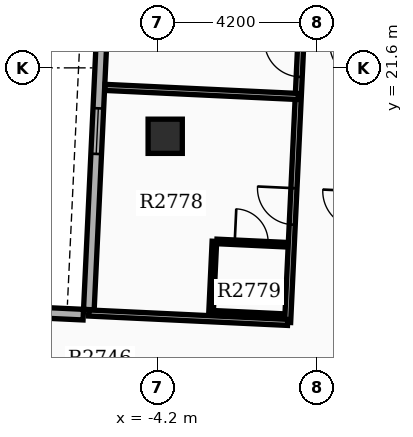
"""IFC4 building model, lengths in metres.
Left out: names, types, materials, properties, quantities, classifications, styles, units other than length and angle.
Written with IfcOpenShell. Run it as: python <this file> out.ifc"""

import sys

from ifc_helpers import new_model, si_unit, direction, frame, frame_2d, origin, origin_2d, place, context, subcontext, project, spatial, rectangle, extrude, element, fill, save


model = new_model("IFC4")
c1 = context("Model", 3, precision=1e-05, world=origin(), true_north=direction((0.0, 1.0)))
c2 = subcontext(c1, "Body", "Model", "MODEL_VIEW")
j1 = project(units=[si_unit("LENGTHUNIT", "METRE"), si_unit("PLANEANGLEUNIT", "RADIAN")], contexts=[c1])
p1 = place(None, origin())
s1 = spatial("IfcSite", under=j1, at=p1, CompositionType="ELEMENT")
p2 = place(p1, origin())
s2 = spatial("IfcBuilding", under=s1, at=p2, CompositionType="ELEMENT")
p3 = place(p2, frame((0.0, 0.0, 172.2)))
s3 = spatial("IfcBuildingStorey", under=s2, at=p3, CompositionType="ELEMENT", Elevation=172.2)
p4 = place(p3, frame((-4.0, 19.8, 0.0), z_axis=(0.0, 0.0, 1.0), x_axis=(1.0, 0.0, 0.0)))
e1 = element("IfcColumn", 1, at=p4, inside=s3, PredefinedType="COLUMN", context=c2, shape_type="SweptSolid", body=[
    extrude(rectangle(XDim=0.9, YDim=0.9, at=origin_2d()), origin(), (0.0, 0.0, 1.0), 3.9),
])
p5 = place(p3, frame((-5.062, 35.318, 0.0), z_axis=(0.0, 0.0, 1.0), x_axis=(-0.047103473814, -0.998890015344, 0.0)))
e2 = element("IfcWall", 2, at=p5, inside=s3, PredefinedType="STANDARD", context=c2, shape_type="SweptSolid", body=[
    extrude(rectangle(XDim=20.1, YDim=0.28, at=frame_2d((10.05, 0.0))), origin(), (0.0, 0.0, 1.0), 2.97),
])
p6 = place(p5, frame((1.6, 0.0, 0.8)))
e3 = element("IfcOpeningElement", 3, at=p6, cuts=e2, PredefinedType="OPENING", context=c2, shape_type="SweptSolid", body=[
    extrude(rectangle(XDim=1.4, YDim=1.6, at=frame_2d((0.7, 0.8))), frame((0.0, 0.15, 0.0), z_axis=(0.0, -1.0, 0.0), x_axis=(1.0, 0.0, 0.0)), (0.0, 0.0, 1.0), 0.3),
])
p7 = place(p5, frame((4.8, 0.0, 0.8)))
e4 = element("IfcOpeningElement", 4, at=p7, cuts=e2, PredefinedType="OPENING", context=c2, shape_type="SweptSolid", body=[
    extrude(rectangle(XDim=1.4, YDim=1.6, at=frame_2d((0.7, 0.8))), frame((0.0, 0.15, 0.0), z_axis=(0.0, -1.0, 0.0), x_axis=(1.0, 0.0, 0.0)), (0.0, 0.0, 1.0), 0.3),
])
p8 = place(p5, frame((8.0, 0.0, 0.8)))
e5 = element("IfcOpeningElement", 5, at=p8, cuts=e2, PredefinedType="OPENING", context=c2, shape_type="SweptSolid", body=[
    extrude(rectangle(XDim=1.4, YDim=1.6, at=frame_2d((0.7, 0.8))), frame((0.0, 0.15, 0.0), z_axis=(0.0, -1.0, 0.0), x_axis=(1.0, 0.0, 0.0)), (0.0, 0.0, 1.0), 0.3),
])
p9 = place(p5, frame((11.2, 0.0, 0.8)))
e6 = element("IfcOpeningElement", 6, at=p9, cuts=e2, PredefinedType="OPENING", context=c2, shape_type="SweptSolid", body=[
    extrude(rectangle(XDim=1.4, YDim=1.6, at=frame_2d((0.7, 0.8))), frame((0.0, 0.15, 0.0), z_axis=(0.0, -1.0, 0.0), x_axis=(1.0, 0.0, 0.0)), (0.0, 0.0, 1.0), 0.3),
])
p10 = place(p5, frame((14.799, 0.0, 0.85)))
e7 = element("IfcOpeningElement", 7, at=p10, cuts=e2, PredefinedType="OPENING", context=c2, shape_type="SweptSolid", body=[
    extrude(rectangle(XDim=1.2, YDim=1.6, at=frame_2d((0.6, 0.8))), frame((0.0, 0.15, 0.0), z_axis=(0.0, -1.0, 0.0), x_axis=(1.0, 0.0, 0.0)), (0.0, 0.0, 1.0), 0.3),
])
p11 = place(p3, frame((-12.448, 15.404, 0.0), z_axis=(0.0, 0.0, 1.0), x_axis=(0.998889082162, -0.047123258997, 0.0)))
e8 = element("IfcWall", 8, at=p11, inside=s3, PredefinedType="STANDARD", context=c2, shape_type="SweptSolid", body=[
    extrude(rectangle(XDim=6.3, YDim=0.28, at=frame_2d((3.15, 0.0))), origin(), (0.0, 0.0, 1.0), 2.97),
])
p12 = place(p3, frame((-0.779, 14.903, 0.0), z_axis=(0.0, 0.0, 1.0), x_axis=(0.047091598416, 0.998890575268, 0.0)))
e9 = element("IfcWall", 9, at=p12, inside=s3, PredefinedType="PARTITIONING", context=c2, shape_type="SweptSolid", body=[
    extrude(rectangle(XDim=9.7, YDim=0.16, at=frame_2d((4.85, 0.0))), origin(), (0.0, 0.0, 1.0), 2.96),
])
p13 = place(p12, frame((2.575, 0.0, 0.0)))
e10 = element("IfcOpeningElement", 10, at=p13, cuts=e9, PredefinedType="OPENING", context=c2, shape_type="SweptSolid", body=[
    extrude(rectangle(XDim=0.96, YDim=2.15, at=frame_2d((0.48, 1.075))), frame((0.0, 0.09, 0.0), z_axis=(0.0, -1.0, 0.0), x_axis=(1.0, 0.0, 0.0)), (0.0, 0.0, 1.0), 0.18),
])
p14 = place(p12, frame((6.467, 0.0, 0.0)))
e11 = element("IfcOpeningElement", 11, at=p14, cuts=e9, PredefinedType="OPENING", context=c2, shape_type="SweptSolid", body=[
    extrude(rectangle(XDim=0.96, YDim=2.15, at=frame_2d((0.48, 1.075))), frame((0.0, 0.09, 0.0), z_axis=(0.0, -1.0, 0.0), x_axis=(1.0, 0.0, 0.0)), (0.0, 0.0, 1.0), 0.18),
])
p15 = place(p3, frame((-0.779, 14.903, 0.0), z_axis=(0.0, 0.0, 1.0), x_axis=(-0.998889957338, 0.047104703898, 0.0)))
e12 = element("IfcWall", 12, at=p15, inside=s3, PredefinedType="PARTITIONING", context=c2, shape_type="SweptSolid", body=[
    extrude(rectangle(XDim=5.24, YDim=0.16, at=frame_2d((2.62, 0.0))), origin(), (0.0, 0.0, 1.0), 2.96),
])
p16 = place(p3, frame((-0.499, 20.847, 0.0), z_axis=(0.0, 0.0, 1.0), x_axis=(-0.998891017342, 0.047082220362, 0.0)))
e13 = element("IfcWall", 13, at=p16, inside=s3, PredefinedType="PARTITIONING", context=c2, shape_type="SweptSolid", body=[
    extrude(rectangle(XDim=5.092, YDim=0.16, at=frame_2d((2.546, 0.0))), origin(), (0.0, 0.0, 1.0), 2.96),
])
p17 = place(p3, frame((-2.641, 17.033, 0.0), z_axis=(0.0, 0.0, 1.0), x_axis=(0.998891083954, -0.047080807099, 0.0)))
e14 = element("IfcWall", 14, at=p17, inside=s3, PredefinedType="PARTITIONING", context=c2, shape_type="SweptSolid", body=[
    extrude(rectangle(XDim=1.82, YDim=0.12, at=frame_2d((0.91, 0.0))), origin(), (0.0, 0.0, 1.0), 2.96),
])
p18 = place(p17, frame((0.47, 0.0, 0.0)))
e15 = element("IfcOpeningElement", 15, at=p18, cuts=e14, PredefinedType="OPENING", context=c2, shape_type="SweptSolid", body=[
    extrude(rectangle(XDim=0.88, YDim=2.1, at=frame_2d((0.44, 1.05))), frame((0.0, 0.07, 0.0), z_axis=(0.0, -1.0, 0.0), x_axis=(1.0, 0.0, 0.0)), (0.0, 0.0, 1.0), 0.14),
])
p19 = place(p3, frame((-2.729, 15.156, 0.0), z_axis=(0.0, 0.0, 1.0), x_axis=(0.998884467853, -0.047220968666, 0.0)))
e16 = element("IfcWall", 16, at=p19, inside=s3, PredefinedType="PARTITIONING", context=c2, shape_type="SweptSolid", body=[
    extrude(rectangle(XDim=1.82, YDim=0.12, at=frame_2d((0.91, 0.0))), origin(), (0.0, 0.0, 1.0), 2.96),
])
p20 = place(p3, frame((-2.794, 15.158, 0.0), z_axis=(0.0, 0.0, 1.0), x_axis=(0.04700985207, 0.998894425757, 0.0)))
e17 = element("IfcWall", 17, at=p20, inside=s3, PredefinedType="PARTITIONING", context=c2, shape_type="SweptSolid", body=[
    extrude(rectangle(XDim=1.88, YDim=0.12, at=frame_2d((0.94, 0.0))), origin(), (0.0, 0.0, 1.0), 2.96),
])
p21 = place(p10, origin())
e18 = element("IfcWindow", 18, at=p21, inside=s3, PartitioningType="SINGLE_PANEL", PredefinedType="WINDOW", context=c2, shape_type="SweptSolid", body=[
    extrude(rectangle(XDim=1.2, YDim=1.6, at=frame_2d((0.6, 0.8))), frame((0.0, 0.03, 0.0), z_axis=(0.0, -1.0, 0.0), x_axis=(1.0, 0.0, 0.0)), (0.0, 0.0, 1.0), 0.06),
])
fill(e7, e18)
p22 = place(p13, origin())
e19 = element("IfcDoor", 19, at=p22, inside=s3, OperationType="SINGLE_SWING_RIGHT", PredefinedType="DOOR", context=c2, shape_type="SweptSolid", body=[
    extrude(rectangle(XDim=0.96, YDim=2.15, at=frame_2d((0.48, 1.075))), frame((0.0, 0.025, 0.0), z_axis=(0.0, -1.0, 0.0), x_axis=(1.0, 0.0, 0.0)), (0.0, 0.0, 1.0), 0.05),
])
fill(e10, e19)
p23 = place(p18, origin())
e20 = element("IfcDoor", 20, at=p23, inside=s3, OperationType="SINGLE_SWING_LEFT", PredefinedType="DOOR", context=c2, shape_type="SweptSolid", body=[
    extrude(rectangle(XDim=0.88, YDim=2.1, at=frame_2d((0.44, 1.05))), frame((0.0, 0.025, 0.0), z_axis=(0.0, -1.0, 0.0), x_axis=(1.0, 0.0, 0.0)), (0.0, 0.0, 1.0), 0.05),
])
fill(e15, e20)
p24 = place(p14, origin())
e21 = element("IfcDoor", 21, at=p24, inside=s3, OperationType="SINGLE_SWING_RIGHT", PredefinedType="DOOR", context=c2, shape_type="SweptSolid", body=[
    extrude(rectangle(XDim=0.96, YDim=2.15, at=frame_2d((0.48, 1.075))), frame((0.0, 0.025, 0.0), z_axis=(0.0, -1.0, 0.0), x_axis=(1.0, 0.0, 0.0)), (0.0, 0.0, 1.0), 0.05),
])
fill(e11, e21)
save(model, sys.argv[1])
